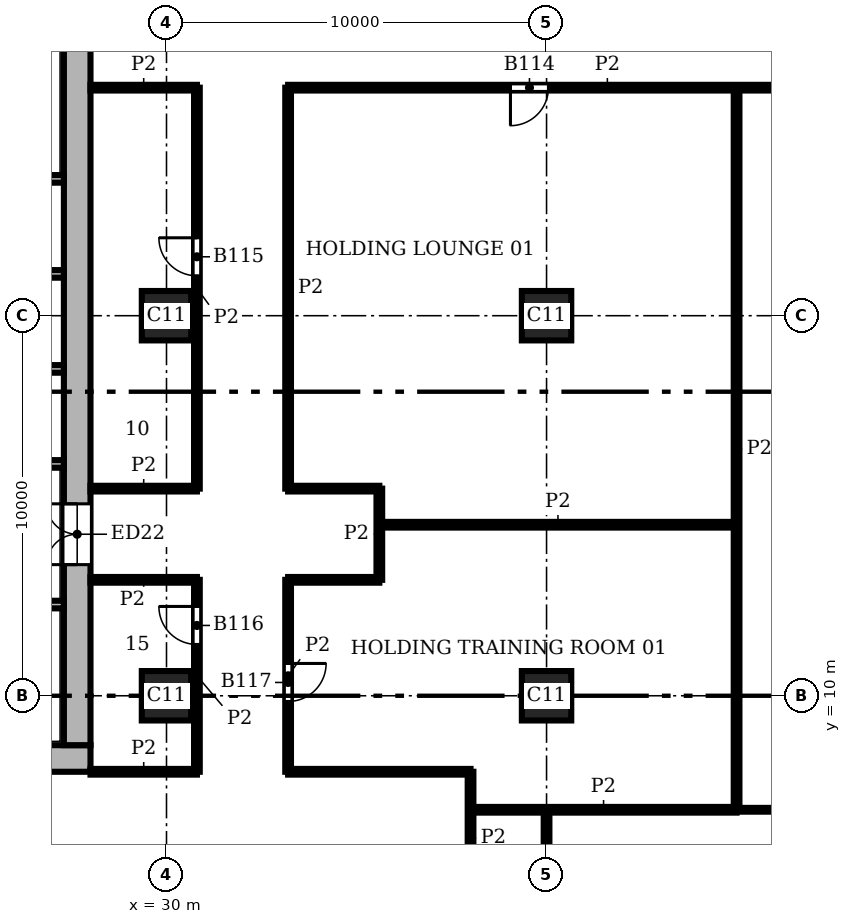
"""IFC4 building model, lengths in metres.
Left out: names, types, materials, properties, quantities, classifications, styles, units other than length and angle.
Written with IfcOpenShell. Run it as: python <this file> out.ifc"""

import sys

from ifc_helpers import new_model, si_unit, direction, frame, frame_2d, origin, origin_2d, place, context, subcontext, project, spatial, rectangle, extrude, element, fill, save


model = new_model("IFC4")
c1 = context("Model", 3, precision=1e-05, world=origin(), true_north=direction((0.0, 1.0)))
c2 = subcontext(c1, "Body", "Model", "MODEL_VIEW")
j1 = project(units=[si_unit("LENGTHUNIT", "METRE"), si_unit("PLANEANGLEUNIT", "RADIAN")], contexts=[c1])
p1 = place(None, origin())
s1 = spatial("IfcSite", under=j1, at=p1, CompositionType="ELEMENT")
p2 = place(p1, origin())
s2 = spatial("IfcBuilding", under=s1, at=p2, CompositionType="ELEMENT")
p3 = place(p2, frame((0.0, 0.0, 131.7)))
s3 = spatial("IfcBuildingStorey", under=s2, at=p3, CompositionType="ELEMENT", Elevation=131.7)
for number, where, z_axis, x_axis in (
    (1, (30.0, 10.0, 0.0), (0.0, 0.0, 1.0), (1.0, 0.0, 0.0)),
    (2, (30.0, 20.0, 0.0), (0.0, 0.0, 1.0), (1.0, 0.0, 0.0)),
    (3, (40.0, 10.0, 0.0), (0.0, 0.0, 1.0), (1.0, 0.0, 0.0)),
    (4, (40.0, 20.0, 0.0), (0.0, 0.0, 1.0), (1.0, 0.0, 0.0)),
):
    element("IfcColumn", number, at=place(p3, frame(where, z_axis=z_axis, x_axis=x_axis)), inside=s3, PredefinedType="COLUMN", context=c2, shape_type="SweptSolid", body=[
        extrude(rectangle(XDim=1.3, YDim=1.3, at=origin_2d()), origin(), (0.0, 0.0, 1.0), 3.9),
    ])
p4 = place(p3, frame((8.0, 8.35, 0.0), z_axis=(0.0, 0.0, 1.0), x_axis=(1.0, 0.0, 0.0)))
e5 = element("IfcWall", 5, at=p4, inside=s3, PredefinedType="SHEAR", context=c2, shape_type="SweptSolid", body=[
    extrude(rectangle(XDim=20.0, YDim=0.7, at=frame_2d((10.0, 0.0))), origin(), (0.0, 0.0, 1.0), 3.9),
])
p5 = place(p3, frame((27.65, 8.7, 0.0), z_axis=(0.0, 0.0, 1.0), x_axis=(0.0, 1.0, 0.0)))
e6 = element("IfcWall", 6, at=p5, inside=s3, PredefinedType="SHEAR", context=c2, shape_type="SweptSolid", body=[
    extrude(rectangle(XDim=18.6, YDim=0.7, at=frame_2d((9.3, 0.0))), origin(), (0.0, 0.0, 1.0), 3.9),
])
p6 = place(p5, frame((4.75, 0.0, 0.0)))
e7 = element("IfcOpeningElement", 7, at=p6, cuts=e6, PredefinedType="OPENING", context=c2, shape_type="SweptSolid", body=[
    extrude(rectangle(XDim=1.6, YDim=2.1, at=frame_2d((0.8, 1.05))), frame((0.0, 0.36, 0.0), z_axis=(0.0, -1.0, 0.0), x_axis=(1.0, 0.0, 0.0)), (0.0, 0.0, 1.0), 0.72),
])
p7 = place(p3, frame((13.8, 12.4, 0.0), z_axis=(0.0, 0.0, 1.0), x_axis=(1.0, 0.0, 0.0)))
e8 = element("IfcWall", 8, at=p7, inside=s3, PredefinedType="SHEAR", context=c2, shape_type="SweptSolid", body=[
    extrude(rectangle(XDim=13.5, YDim=0.2, at=frame_2d((6.75, 0.0))), origin(), (0.0, 0.0, 1.0), 3.58),
])
p8 = place(p7, frame((2.4, 0.0, 0.0)))
e9 = element("IfcOpeningElement", 9, at=p8, cuts=e8, PredefinedType="OPENING", context=c2, shape_type="SweptSolid", body=[
    extrude(rectangle(XDim=1.1, YDim=2.1, at=frame_2d((0.55, 1.05))), frame((0.0, 0.11, 0.0), z_axis=(0.0, -1.0, 0.0), x_axis=(1.0, 0.0, 0.0)), (0.0, 0.0, 1.0), 0.22),
])
p9 = place(p7, frame((4.9, 0.0, 0.0)))
e10 = element("IfcOpeningElement", 10, at=p9, cuts=e8, PredefinedType="OPENING", context=c2, shape_type="SweptSolid", body=[
    extrude(rectangle(XDim=1.1, YDim=2.1, at=frame_2d((0.55, 1.05))), frame((0.0, 0.11, 0.0), z_axis=(0.0, -1.0, 0.0), x_axis=(1.0, 0.0, 0.0)), (0.0, 0.0, 1.0), 0.22),
])
p10 = place(p7, frame((0.2, 0.0, 0.0)))
e11 = element("IfcOpeningElement", 11, at=p10, cuts=e8, PredefinedType="OPENING", context=c2, shape_type="SweptSolid", body=[
    extrude(rectangle(XDim=1.0, YDim=2.1, at=frame_2d((0.5, 1.05))), frame((0.0, 0.11, 0.0), z_axis=(0.0, -1.0, 0.0), x_axis=(1.0, 0.0, 0.0)), (0.0, 0.0, 1.0), 0.22),
])
for number, where, z_axis, x_axis in (
    (12, (24.3, 16.1, 0.0), (0.0, 0.0, 1.0), (1.0, 0.0, 0.0)),
    (13, (24.3, 18.6, 0.0), (0.0, 0.0, 1.0), (1.0, 0.0, 0.0)),
    (14, (24.3, 21.1, 0.0), (0.0, 0.0, 1.0), (1.0, 0.0, 0.0)),
):
    element("IfcWall", number, at=place(p3, frame(where, z_axis=z_axis, x_axis=x_axis)), inside=s3, PredefinedType="SHEAR", context=c2, shape_type="SweptSolid", body=[
        extrude(rectangle(XDim=3.0, YDim=0.2, at=frame_2d((1.5, 0.0))), origin(), (0.0, 0.0, 1.0), 3.58),
    ])
p11 = place(p3, frame((13.8, 23.6, 0.0), z_axis=(0.0, 0.0, 1.0), x_axis=(1.0, 0.0, 0.0)))
e15 = element("IfcWall", 15, at=p11, inside=s3, PredefinedType="SHEAR", context=c2, shape_type="SweptSolid", body=[
    extrude(rectangle(XDim=13.5, YDim=0.2, at=frame_2d((6.75, 0.0))), origin(), (0.0, 0.0, 1.0), 3.58),
])
p12 = place(p11, frame((2.4, 0.0, 0.0)))
e16 = element("IfcOpeningElement", 16, at=p12, cuts=e15, PredefinedType="OPENING", context=c2, shape_type="SweptSolid", body=[
    extrude(rectangle(XDim=1.1, YDim=2.1, at=frame_2d((0.55, 1.05))), frame((0.0, 0.11, 0.0), z_axis=(0.0, -1.0, 0.0), x_axis=(1.0, 0.0, 0.0)), (0.0, 0.0, 1.0), 0.22),
])
p13 = place(p11, frame((4.9, 0.0, 0.0)))
e17 = element("IfcOpeningElement", 17, at=p13, cuts=e15, PredefinedType="OPENING", context=c2, shape_type="SweptSolid", body=[
    extrude(rectangle(XDim=1.1, YDim=2.1, at=frame_2d((0.55, 1.05))), frame((0.0, 0.11, 0.0), z_axis=(0.0, -1.0, 0.0), x_axis=(1.0, 0.0, 0.0)), (0.0, 0.0, 1.0), 0.22),
])
p14 = place(p11, frame((0.2, 0.0, 0.0)))
e18 = element("IfcOpeningElement", 18, at=p14, cuts=e15, PredefinedType="OPENING", context=c2, shape_type="SweptSolid", body=[
    extrude(rectangle(XDim=1.0, YDim=2.1, at=frame_2d((0.5, 1.05))), frame((0.0, 0.11, 0.0), z_axis=(0.0, -1.0, 0.0), x_axis=(1.0, 0.0, 0.0)), (0.0, 0.0, 1.0), 0.22),
])
p15 = place(p3, frame((45.0, 7.0, 0.0), z_axis=(0.0, 0.0, 1.0), x_axis=(1.0, 0.0, 0.0)))
e19 = element("IfcWall", 19, at=p15, inside=s3, PredefinedType="PARTITIONING", context=c2, shape_type="SweptSolid", body=[
    extrude(rectangle(XDim=5.0, YDim=0.1, at=frame_2d((2.5, 0.0))), origin(), (0.0, 0.0, 1.0), 3.58),
])
p16 = place(p3, frame((30.8, 8.0, 0.0), z_axis=(0.0, 0.0, 1.0), x_axis=(0.0, 1.0, 0.0)))
e20 = element("IfcWall", 20, at=p16, inside=s3, PredefinedType="PARTITIONING", context=c2, shape_type="SweptSolid", body=[
    extrude(rectangle(XDim=5.05, YDim=0.15, at=frame_2d((2.525, 0.0))), origin(), (0.0, 0.0, 1.0), 3.58),
])
p17 = place(p16, frame((3.35, 0.0, 0.0)))
e21 = element("IfcOpeningElement", 21, at=p17, cuts=e20, PredefinedType="OPENING", context=c2, shape_type="SweptSolid", body=[
    extrude(rectangle(XDim=1.0, YDim=2.1, at=frame_2d((0.5, 1.05))), frame((0.0, 0.085, 0.0), z_axis=(0.0, -1.0, 0.0), x_axis=(1.0, 0.0, 0.0)), (0.0, 0.0, 1.0), 0.17),
])
p18 = place(p3, frame((30.8, 15.45, 0.0), z_axis=(0.0, 0.0, 1.0), x_axis=(0.0, 1.0, 0.0)))
e22 = element("IfcWall", 22, at=p18, inside=s3, PredefinedType="PARTITIONING", context=c2, shape_type="SweptSolid", body=[
    extrude(rectangle(XDim=10.55, YDim=0.15, at=frame_2d((5.275, 0.0))), origin(), (0.0, 0.0, 1.0), 3.58),
])
p19 = place(p18, frame((5.6, 0.0, 0.0)))
e23 = element("IfcOpeningElement", 23, at=p19, cuts=e22, PredefinedType="OPENING", context=c2, shape_type="SweptSolid", body=[
    extrude(rectangle(XDim=1.0, YDim=2.1, at=frame_2d((0.5, 1.05))), frame((0.0, 0.085, 0.0), z_axis=(0.0, -1.0, 0.0), x_axis=(1.0, 0.0, 0.0)), (0.0, 0.0, 1.0), 0.17),
])
p20 = place(p3, frame((33.2, 8.0, 0.0), z_axis=(0.0, 0.0, 1.0), x_axis=(0.0, 1.0, 0.0)))
e24 = element("IfcWall", 24, at=p20, inside=s3, PredefinedType="PARTITIONING", context=c2, shape_type="SweptSolid", body=[
    extrude(rectangle(XDim=5.05, YDim=0.15, at=frame_2d((2.525, 0.0))), origin(), (0.0, 0.0, 1.0), 3.58),
])
p21 = place(p20, frame((1.85, 0.0, 0.0)))
e25 = element("IfcOpeningElement", 25, at=p21, cuts=e24, PredefinedType="OPENING", context=c2, shape_type="SweptSolid", body=[
    extrude(rectangle(XDim=1.0, YDim=2.1, at=frame_2d((0.5, 1.05))), frame((0.0, 0.085, 0.0), z_axis=(0.0, -1.0, 0.0), x_axis=(1.0, 0.0, 0.0)), (0.0, 0.0, 1.0), 0.17),
])
p22 = place(p3, frame((33.2, 15.45, 0.0), z_axis=(0.0, 0.0, 1.0), x_axis=(0.0, 1.0, 0.0)))
e26 = element("IfcWall", 26, at=p22, inside=s3, PredefinedType="PARTITIONING", context=c2, shape_type="SweptSolid", body=[
    extrude(rectangle(XDim=10.55, YDim=0.15, at=frame_2d((5.275, 0.0))), origin(), (0.0, 0.0, 1.0), 3.58),
])
p23 = place(p3, frame((35.6, 13.05, 0.0), z_axis=(0.0, 0.0, 1.0), x_axis=(0.0, 1.0, 0.0)))
e27 = element("IfcWall", 27, at=p23, inside=s3, PredefinedType="PARTITIONING", context=c2, shape_type="SweptSolid", body=[
    extrude(rectangle(XDim=2.4, YDim=0.15, at=frame_2d((1.2, 0.0))), origin(), (0.0, 0.0, 1.0), 3.58),
])
p24 = place(p3, frame((38.0, 4.5, 0.0), z_axis=(0.0, 0.0, 1.0), x_axis=(0.0, 1.0, 0.0)))
e28 = element("IfcWall", 28, at=p24, inside=s3, PredefinedType="PARTITIONING", context=c2, shape_type="SweptSolid", body=[
    extrude(rectangle(XDim=3.5, YDim=0.15, at=frame_2d((1.75, 0.0))), origin(), (0.0, 0.0, 1.0), 3.58),
])
p25 = place(p3, frame((40.0, 0.45, 0.0), z_axis=(0.0, 0.0, 1.0), x_axis=(0.0, 1.0, 0.0)))
e29 = element("IfcWall", 29, at=p25, inside=s3, PredefinedType="PARTITIONING", context=c2, shape_type="SweptSolid", body=[
    extrude(rectangle(XDim=6.55, YDim=0.15, at=frame_2d((3.275, 0.0))), origin(), (0.0, 0.0, 1.0), 3.58),
])
p26 = place(p3, frame((45.0, 7.0, 0.0), z_axis=(0.0, 0.0, 1.0), x_axis=(0.0, 1.0, 0.0)))
e30 = element("IfcWall", 30, at=p26, inside=s3, PredefinedType="PARTITIONING", context=c2, shape_type="SweptSolid", body=[
    extrude(rectangle(XDim=19.0, YDim=0.15, at=frame_2d((9.5, 0.0))), origin(), (0.0, 0.0, 1.0), 3.58),
])
p27 = place(p3, frame((38.0, 7.0, 0.0), z_axis=(0.0, 0.0, 1.0), x_axis=(1.0, 0.0, 0.0)))
e31 = element("IfcWall", 31, at=p27, inside=s3, PredefinedType="PARTITIONING", context=c2, shape_type="SweptSolid", body=[
    extrude(rectangle(XDim=7.0, YDim=0.15, at=frame_2d((3.5, 0.0))), origin(), (0.0, 0.0, 1.0), 3.58),
])
p28 = place(p3, frame((28.0, 8.0, 0.0), z_axis=(0.0, 0.0, 1.0), x_axis=(1.0, 0.0, 0.0)))
e32 = element("IfcWall", 32, at=p28, inside=s3, PredefinedType="PARTITIONING", context=c2, shape_type="SweptSolid", body=[
    extrude(rectangle(XDim=2.8, YDim=0.15, at=frame_2d((1.4, 0.0))), origin(), (0.0, 0.0, 1.0), 3.58),
])
p29 = place(p3, frame((33.2, 8.0, 0.0), z_axis=(0.0, 0.0, 1.0), x_axis=(1.0, 0.0, 0.0)))
e33 = element("IfcWall", 33, at=p29, inside=s3, PredefinedType="PARTITIONING", context=c2, shape_type="SweptSolid", body=[
    extrude(rectangle(XDim=4.8, YDim=0.15, at=frame_2d((2.4, 0.0))), origin(), (0.0, 0.0, 1.0), 3.58),
])
p30 = place(p3, frame((28.0, 13.05, 0.0), z_axis=(0.0, 0.0, 1.0), x_axis=(1.0, 0.0, 0.0)))
e34 = element("IfcWall", 34, at=p30, inside=s3, PredefinedType="PARTITIONING", context=c2, shape_type="SweptSolid", body=[
    extrude(rectangle(XDim=2.8, YDim=0.15, at=frame_2d((1.4, 0.0))), origin(), (0.0, 0.0, 1.0), 3.58),
])
p31 = place(p3, frame((33.2, 13.05, 0.0), z_axis=(0.0, 0.0, 1.0), x_axis=(1.0, 0.0, 0.0)))
e35 = element("IfcWall", 35, at=p31, inside=s3, PredefinedType="PARTITIONING", context=c2, shape_type="SweptSolid", body=[
    extrude(rectangle(XDim=2.4, YDim=0.15, at=frame_2d((1.2, 0.0))), origin(), (0.0, 0.0, 1.0), 3.58),
])
p32 = place(p3, frame((35.6, 14.5, 0.0), z_axis=(0.0, 0.0, 1.0), x_axis=(1.0, 0.0, 0.0)))
e36 = element("IfcWall", 36, at=p32, inside=s3, PredefinedType="PARTITIONING", context=c2, shape_type="SweptSolid", body=[
    extrude(rectangle(XDim=9.4, YDim=0.15, at=frame_2d((4.7, 0.0))), origin(), (0.0, 0.0, 1.0), 3.58),
])
p33 = place(p3, frame((28.0, 15.45, 0.0), z_axis=(0.0, 0.0, 1.0), x_axis=(1.0, 0.0, 0.0)))
e37 = element("IfcWall", 37, at=p33, inside=s3, PredefinedType="PARTITIONING", context=c2, shape_type="SweptSolid", body=[
    extrude(rectangle(XDim=2.8, YDim=0.15, at=frame_2d((1.4, 0.0))), origin(), (0.0, 0.0, 1.0), 3.58),
])
p34 = place(p3, frame((33.2, 15.45, 0.0), z_axis=(0.0, 0.0, 1.0), x_axis=(1.0, 0.0, 0.0)))
e38 = element("IfcWall", 38, at=p34, inside=s3, PredefinedType="PARTITIONING", context=c2, shape_type="SweptSolid", body=[
    extrude(rectangle(XDim=2.4, YDim=0.15, at=frame_2d((1.2, 0.0))), origin(), (0.0, 0.0, 1.0), 3.58),
])
p35 = place(p3, frame((28.0, 26.0, 0.0), z_axis=(0.0, 0.0, 1.0), x_axis=(1.0, 0.0, 0.0)))
e39 = element("IfcWall", 39, at=p35, inside=s3, PredefinedType="PARTITIONING", context=c2, shape_type="SweptSolid", body=[
    extrude(rectangle(XDim=2.8, YDim=0.15, at=frame_2d((1.4, 0.0))), origin(), (0.0, 0.0, 1.0), 3.58),
])
p36 = place(p3, frame((33.2, 26.0, 0.0), z_axis=(0.0, 0.0, 1.0), x_axis=(1.0, 0.0, 0.0)))
e40 = element("IfcWall", 40, at=p36, inside=s3, PredefinedType="PARTITIONING", context=c2, shape_type="SweptSolid", body=[
    extrude(rectangle(XDim=16.8, YDim=0.15, at=frame_2d((8.4, 0.0))), origin(), (0.0, 0.0, 1.0), 3.58),
])
p37 = place(p36, frame((5.85, 0.0, 0.0)))
e41 = element("IfcOpeningElement", 41, at=p37, cuts=e40, PredefinedType="OPENING", context=c2, shape_type="SweptSolid", body=[
    extrude(rectangle(XDim=1.0, YDim=2.1, at=frame_2d((0.5, 1.05))), frame((0.0, 0.085, 0.0), z_axis=(0.0, -1.0, 0.0), x_axis=(1.0, 0.0, 0.0)), (0.0, 0.0, 1.0), 0.17),
])
p38 = place(p36, frame((13.65, 0.0, 0.0)))
e42 = element("IfcOpeningElement", 42, at=p38, cuts=e40, PredefinedType="OPENING", context=c2, shape_type="SweptSolid", body=[
    extrude(rectangle(XDim=1.8, YDim=2.1, at=frame_2d((0.9, 1.05))), frame((0.0, 0.085, 0.0), z_axis=(0.0, -1.0, 0.0), x_axis=(1.0, 0.0, 0.0)), (0.0, 0.0, 1.0), 0.17),
])
p39 = place(p6, origin())
e43 = element("IfcDoor", 43, at=p39, inside=s3, OperationType="DOUBLE_DOOR_SINGLE_SWING", PredefinedType="DOOR", context=c2, shape_type="SweptSolid", body=[
    extrude(rectangle(XDim=1.6, YDim=2.1, at=frame_2d((0.8, 1.05))), frame((0.0, 0.025, 0.0), z_axis=(0.0, -1.0, 0.0), x_axis=(1.0, 0.0, 0.0)), (0.0, 0.0, 1.0), 0.05),
])
fill(e7, e43)
p40 = place(p37, frame((1.0, 0.0, 0.0), z_axis=(0.0, 0.0, 1.0), x_axis=(-1.0, 0.0, 0.0)))
e44 = element("IfcDoor", 44, at=p40, inside=s3, OperationType="SINGLE_SWING_RIGHT", PredefinedType="DOOR", context=c2, shape_type="SweptSolid", body=[
    extrude(rectangle(XDim=1.0, YDim=2.1, at=frame_2d((0.5, 1.05))), frame((0.0, 0.025, 0.0), z_axis=(0.0, -1.0, 0.0), x_axis=(1.0, 0.0, 0.0)), (0.0, 0.0, 1.0), 0.05),
])
fill(e41, e44)
p41 = place(p19, origin())
e45 = element("IfcDoor", 45, at=p41, inside=s3, OperationType="SINGLE_SWING_RIGHT", PredefinedType="DOOR", context=c2, shape_type="SweptSolid", body=[
    extrude(rectangle(XDim=1.0, YDim=2.1, at=frame_2d((0.5, 1.05))), frame((0.0, 0.025, 0.0), z_axis=(0.0, -1.0, 0.0), x_axis=(1.0, 0.0, 0.0)), (0.0, 0.0, 1.0), 0.05),
])
fill(e23, e45)
p42 = place(p17, origin())
e46 = element("IfcDoor", 46, at=p42, inside=s3, OperationType="SINGLE_SWING_RIGHT", PredefinedType="DOOR", context=c2, shape_type="SweptSolid", body=[
    extrude(rectangle(XDim=1.0, YDim=2.1, at=frame_2d((0.5, 1.05))), frame((0.0, 0.025, 0.0), z_axis=(0.0, -1.0, 0.0), x_axis=(1.0, 0.0, 0.0)), (0.0, 0.0, 1.0), 0.05),
])
fill(e21, e46)
p43 = place(p21, frame((1.0, 0.0, 0.0), z_axis=(0.0, 0.0, 1.0), x_axis=(-1.0, 0.0, 0.0)))
e47 = element("IfcDoor", 47, at=p43, inside=s3, OperationType="SINGLE_SWING_LEFT", PredefinedType="DOOR", context=c2, shape_type="SweptSolid", body=[
    extrude(rectangle(XDim=1.0, YDim=2.1, at=frame_2d((0.5, 1.05))), frame((0.0, 0.025, 0.0), z_axis=(0.0, -1.0, 0.0), x_axis=(1.0, 0.0, 0.0)), (0.0, 0.0, 1.0), 0.05),
])
fill(e25, e47)
save(model, sys.argv[1])
